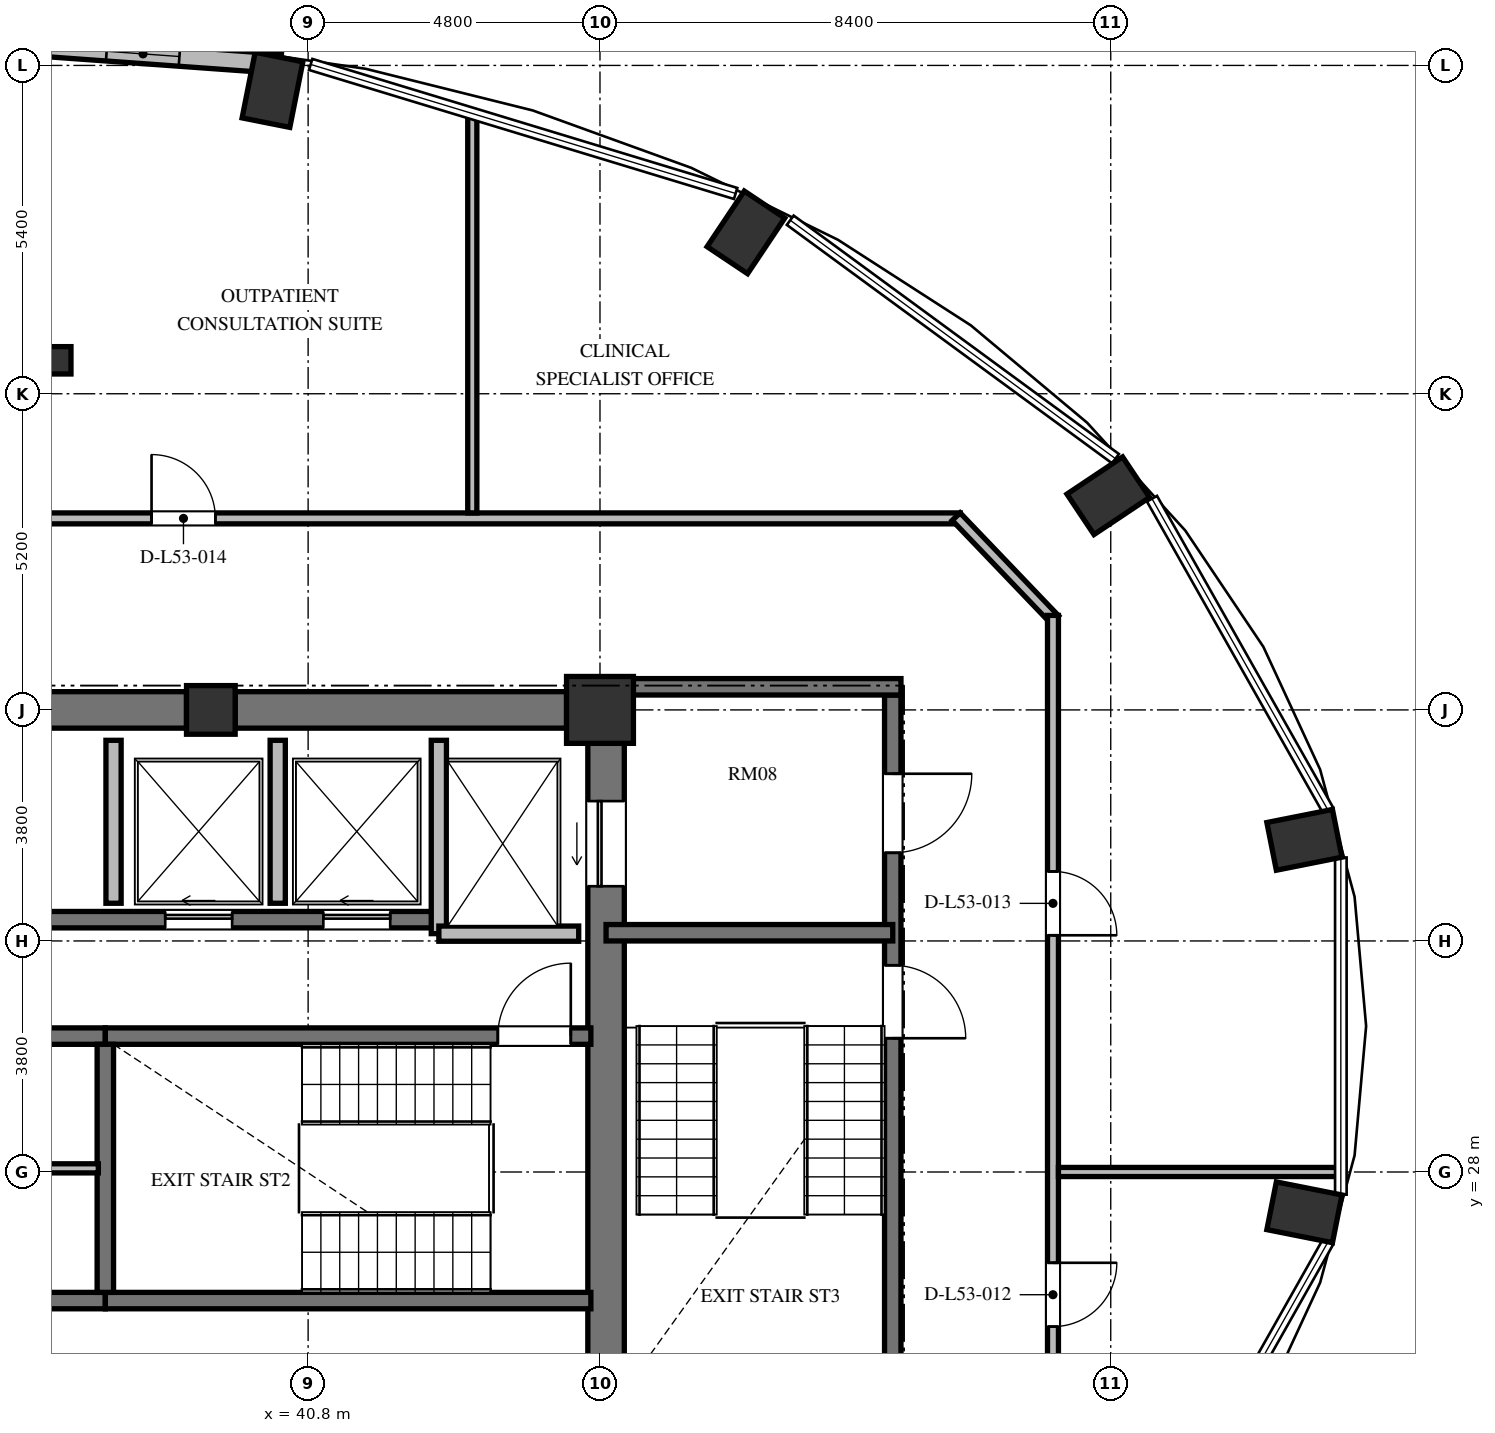
"""IFC4 building model, lengths in metres.
Left out: names, types, materials, properties, quantities, classifications, styles, units other than length and angle.
Written with IfcOpenShell. Run it as: python <this file> out.ifc"""

import sys

from ifc_helpers import new_model, si_unit, direction, frame, frame_2d, origin, origin_2d, place, context, subcontext, project, spatial, rectangle, extrude, element, fill, save


model = new_model("IFC4")
c1 = context("Model", 3, precision=1e-05, world=origin(), true_north=direction((0.0, 1.0)))
c2 = subcontext(c1, "Body", "Model", "MODEL_VIEW")
j1 = project(units=[si_unit("LENGTHUNIT", "METRE"), si_unit("PLANEANGLEUNIT", "RADIAN")], contexts=[c1])
p1 = place(None, origin())
s1 = spatial("IfcSite", under=j1, at=p1, CompositionType="ELEMENT")
p2 = place(p1, origin())
s2 = spatial("IfcBuilding", under=s1, at=p2, CompositionType="ELEMENT")
p3 = place(p2, frame((0.0, 0.0, 205.776)))
s3 = spatial("IfcBuildingStorey", under=s2, at=p3, CompositionType="ELEMENT", Elevation=205.776)
for number, where, z_axis, x_axis in (
    (1, (57.185, 27.337, 0.0), (0.0, 0.0, 1.0), (0.981, -0.195, 0.0)),
    (2, (57.185, 33.463, 0.0), (0.0, 0.0, 1.0), (0.981, 0.195, 0.0)),
    (3, (53.96, 39.123, 0.0), (0.0, 0.0, 1.0), (0.831, 0.556, 0.0)),
    (4, (48.0, 43.454, 0.0), (0.0, 0.0, 1.0), (0.556, 0.831, 0.0)),
    (5, (40.214, 45.798, 0.0), (0.0, 0.0, 1.0), (0.195, 0.981, 0.0)),
):
    element("IfcColumn", number, at=place(p3, frame(where, z_axis=z_axis, x_axis=x_axis)), inside=s3, PredefinedType="COLUMN", context=c2, shape_type="SweptSolid", body=[
        extrude(rectangle(XDim=1.1, YDim=0.8, at=origin_2d()), origin(), (0.0, 0.0, 1.0), 3.648),
    ])
p4 = place(p3, frame((45.6, 35.6, 0.0), z_axis=(0.0, 0.0, 1.0), x_axis=(1.0, 0.0, 0.0)))
e6 = element("IfcColumn", 6, at=p4, inside=s3, PredefinedType="COLUMN", context=c2, shape_type="SweptSolid", body=[
    extrude(rectangle(XDim=1.1, YDim=1.1, at=origin_2d()), origin(), (0.0, 0.0, 1.0), 3.648),
])
p5 = place(p3, frame((39.2, 35.6, 0.0), z_axis=(0.0, 0.0, 1.0), x_axis=(1.0, 0.0, 0.0)))
e7 = element("IfcColumn", 7, at=p5, inside=s3, PredefinedType="COLUMN", context=c2, shape_type="SweptSolid", body=[
    extrude(rectangle(XDim=0.8, YDim=0.8, at=origin_2d()), origin(), (0.0, 0.0, 1.0), 3.648),
])
p6 = place(p3, frame((36.6, 41.35, 0.0), z_axis=(0.0, 0.0, 1.0), x_axis=(1.0, 0.0, 0.0)))
e8 = element("IfcColumn", 8, at=p6, inside=s3, PredefinedType="PILASTER", context=c2, shape_type="SweptSolid", body=[
    extrude(rectangle(XDim=0.6, YDim=0.45, at=origin_2d()), origin(), (0.0, 0.0, 1.0), 3.648),
])
p7 = place(p3, frame((45.7, 20.95, 0.0), z_axis=(0.0, 0.0, 1.0), x_axis=(0.0, 1.0, 0.0)))
e9 = element("IfcWall", 9, at=p7, inside=s3, PredefinedType="SHEAR", context=c2, shape_type="SweptSolid", body=[
    extrude(rectangle(XDim=14.1, YDim=0.6, at=frame_2d((7.05, 0.0))), origin(), (0.0, 0.0, 1.0), 3.648),
])
p8 = place(p7, frame((11.75, 0.0, 0.0)))
e10 = element("IfcOpeningElement", 10, at=p8, cuts=e9, PredefinedType="OPENING", context=c2, shape_type="SweptSolid", body=[
    extrude(rectangle(XDim=1.4, YDim=2.3, at=frame_2d((0.7, 1.15))), frame((0.0, 0.31, 0.0), z_axis=(0.0, -1.0, 0.0), x_axis=(1.0, 0.0, 0.0)), (0.0, 0.0, 1.0), 0.62),
])
p9 = place(p7, frame((0.95, 0.0, 0.0)))
e11 = element("IfcOpeningElement", 11, at=p9, cuts=e9, PredefinedType="OPENING", context=c2, shape_type="SweptSolid", body=[
    extrude(rectangle(XDim=1.4, YDim=2.3, at=frame_2d((0.7, 1.15))), frame((0.0, 0.31, 0.0), z_axis=(0.0, -1.0, 0.0), x_axis=(1.0, 0.0, 0.0)), (0.0, 0.0, 1.0), 0.62),
])
p10 = place(p3, frame((33.2, 35.6, 0.0), z_axis=(0.0, 0.0, 1.0), x_axis=(1.0, 0.0, 0.0)))
e12 = element("IfcWall", 12, at=p10, inside=s3, PredefinedType="SHEAR", context=c2, shape_type="SweptSolid", body=[
    extrude(rectangle(XDim=5.6, YDim=0.6, at=frame_2d((2.8, 0.0))), origin(), (0.0, 0.0, 1.0), 3.648),
])
p11 = place(p3, frame((39.6, 35.6, 0.0), z_axis=(0.0, 0.0, 1.0), x_axis=(1.0, 0.0, 0.0)))
e13 = element("IfcWall", 13, at=p11, inside=s3, PredefinedType="SHEAR", context=c2, shape_type="SweptSolid", body=[
    extrude(rectangle(XDim=5.45, YDim=0.6, at=frame_2d((2.725, 0.0))), origin(), (0.0, 0.0, 1.0), 3.648),
])
p12 = place(p3, frame((40.35, 46.226, 0.0), z_axis=(0.0, 0.0, 1.0), x_axis=(-0.997409061056, 0.071938619141, 0.0)))
e14 = element("IfcWall", 14, at=p12, inside=s3, PredefinedType="SOLIDWALL", context=c2, shape_type="SweptSolid", body=[
    extrude(rectangle(XDim=4.541, YDim=0.32, at=frame_2d((2.271, 0.0))), origin(), (0.0, 0.0, 1.0), 3.448),
])
p13 = place(p12, frame((1.67, 0.0, 0.85)))
e15 = element("IfcOpeningElement", 15, at=p13, cuts=e14, PredefinedType="OPENING", context=c2, shape_type="SweptSolid", body=[
    extrude(rectangle(XDim=1.2, YDim=2.2, at=frame_2d((0.6, 1.1))), frame((0.0, 0.17, 0.0), z_axis=(0.0, -1.0, 0.0), x_axis=(1.0, 0.0, 0.0)), (0.0, 0.0, 1.0), 0.34),
])
p14 = place(p3, frame((34.535, 30.235, 0.0), z_axis=(0.0, 0.0, 1.0), x_axis=(1.0, 0.0, 0.0)))
e16 = element("IfcWall", 16, at=p14, inside=s3, PredefinedType="SHEAR", context=c2, shape_type="SweptSolid", body=[
    extrude(rectangle(XDim=2.93, YDim=0.27, at=frame_2d((1.465, 0.0))), origin(), (0.0, 0.0, 1.0), 3.648),
])
p15 = place(p14, frame((0.915, 0.0, 0.0)))
e17 = element("IfcOpeningElement", 17, at=p15, cuts=e16, PredefinedType="OPENING", context=c2, shape_type="SweptSolid", body=[
    extrude(rectangle(XDim=1.1, YDim=2.15, at=frame_2d((0.55, 1.075))), frame((0.0, 0.145, 0.0), z_axis=(0.0, -1.0, 0.0), x_axis=(1.0, 0.0, 0.0)), (0.0, 0.0, 1.0), 0.29),
])
p16 = place(p3, frame((37.465, 30.235, 0.0), z_axis=(0.0, 0.0, 1.0), x_axis=(1.0, 0.0, 0.0)))
e18 = element("IfcWall", 18, at=p16, inside=s3, PredefinedType="SHEAR", context=c2, shape_type="SweptSolid", body=[
    extrude(rectangle(XDim=7.985, YDim=0.27, at=frame_2d((3.992, 0.0))), origin(), (0.0, 0.0, 1.0), 3.648),
])
p17 = place(p16, frame((6.455, 0.0, 0.0)))
e19 = element("IfcOpeningElement", 19, at=p17, cuts=e18, PredefinedType="OPENING", context=c2, shape_type="SweptSolid", body=[
    extrude(rectangle(XDim=1.2, YDim=2.15, at=frame_2d((0.6, 1.075))), frame((0.0, 0.145, 0.0), z_axis=(0.0, -1.0, 0.0), x_axis=(1.0, 0.0, 0.0)), (0.0, 0.0, 1.0), 0.29),
])
p18 = place(p3, frame((34.535, 25.885, 0.0), z_axis=(0.0, 0.0, 1.0), x_axis=(1.0, 0.0, 0.0)))
e20 = element("IfcWall", 20, at=p18, inside=s3, PredefinedType="SHEAR", context=c2, shape_type="SweptSolid", body=[
    extrude(rectangle(XDim=2.93, YDim=0.27, at=frame_2d((1.465, 0.0))), origin(), (0.0, 0.0, 1.0), 3.648),
])
p19 = place(p18, frame((0.94, 0.0, 0.0)))
e21 = element("IfcOpeningElement", 21, at=p19, cuts=e20, PredefinedType="OPENING", context=c2, shape_type="SweptSolid", body=[
    extrude(rectangle(XDim=1.05, YDim=2.15, at=frame_2d((0.525, 1.075))), frame((0.0, 0.145, 0.0), z_axis=(0.0, -1.0, 0.0), x_axis=(1.0, 0.0, 0.0)), (0.0, 0.0, 1.0), 0.29),
])
p20 = place(p3, frame((37.465, 25.885, 0.0), z_axis=(0.0, 0.0, 1.0), x_axis=(1.0, 0.0, 0.0)))
e22 = element("IfcWall", 22, at=p20, inside=s3, PredefinedType="SHEAR", context=c2, shape_type="SweptSolid", body=[
    extrude(rectangle(XDim=7.985, YDim=0.27, at=frame_2d((3.992, 0.0))), origin(), (0.0, 0.0, 1.0), 3.648),
])
p21 = place(p3, frame((37.465, 26.02, 0.0), z_axis=(0.0, 0.0, 1.0), x_axis=(0.0, 1.0, 0.0)))
e23 = element("IfcWall", 23, at=p21, inside=s3, PredefinedType="SHEAR", context=c2, shape_type="SweptSolid", body=[
    extrude(rectangle(XDim=4.08, YDim=0.27, at=frame_2d((2.04, 0.0))), origin(), (0.0, 0.0, 1.0), 3.648),
])
p22 = place(p3, frame((34.65, 28.06, 0.0), z_axis=(0.0, 0.0, 1.0), x_axis=(1.0, 0.0, 0.0)))
e24 = element("IfcWall", 24, at=p22, inside=s3, PredefinedType="PARTITIONING", context=c2, shape_type="SweptSolid", body=[
    extrude(rectangle(XDim=2.7, YDim=0.15, at=frame_2d((1.35, 0.0))), origin(), (0.0, 0.0, 1.0), 3.448),
])
p23 = place(p3, frame((26.55, 32.15, 0.0), z_axis=(0.0, 0.0, 1.0), x_axis=(1.0, 0.0, 0.0)))
e25 = element("IfcWall", 25, at=p23, inside=s3, PredefinedType="SHEAR", context=c2, shape_type="SweptSolid", body=[
    extrude(rectangle(XDim=16.4, YDim=0.27, at=frame_2d((8.2, 0.0))), origin(), (0.0, 0.0, 1.0), 3.648),
])
p24 = place(p23, frame((2.175, 0.0, 0.0)))
e26 = element("IfcOpeningElement", 26, at=p24, cuts=e25, PredefinedType="OPENING", context=c2, shape_type="SweptSolid", body=[
    extrude(rectangle(XDim=1.05, YDim=2.15, at=frame_2d((0.525, 1.075))), frame((0.0, 0.145, 0.0), z_axis=(0.0, -1.0, 0.0), x_axis=(1.0, 0.0, 0.0)), (0.0, 0.0, 1.0), 0.29),
])
p25 = place(p23, frame((7.575, 0.0, 0.0)))
e27 = element("IfcOpeningElement", 27, at=p25, cuts=e25, PredefinedType="OPENING", context=c2, shape_type="SweptSolid", body=[
    extrude(rectangle(XDim=1.05, YDim=2.15, at=frame_2d((0.525, 1.075))), frame((0.0, 0.145, 0.0), z_axis=(0.0, -1.0, 0.0), x_axis=(1.0, 0.0, 0.0)), (0.0, 0.0, 1.0), 0.29),
])
p26 = place(p23, frame((11.9, 0.0, 0.0)))
e28 = element("IfcOpeningElement", 28, at=p26, cuts=e25, PredefinedType="OPENING", context=c2, shape_type="SweptSolid", body=[
    extrude(rectangle(XDim=1.1, YDim=2.2, at=frame_2d((0.55, 1.1))), frame((0.0, 0.145, 0.0), z_axis=(0.0, -1.0, 0.0), x_axis=(1.0, 0.0, 0.0)), (0.0, 0.0, 1.0), 0.29),
])
p27 = place(p23, frame((14.5, 0.0, 0.0)))
e29 = element("IfcOpeningElement", 29, at=p27, cuts=e25, PredefinedType="OPENING", context=c2, shape_type="SweptSolid", body=[
    extrude(rectangle(XDim=1.1, YDim=2.2, at=frame_2d((0.55, 1.1))), frame((0.0, 0.145, 0.0), z_axis=(0.0, -1.0, 0.0), x_axis=(1.0, 0.0, 0.0)), (0.0, 0.0, 1.0), 0.29),
])
p28 = place(p3, frame((42.95, 31.92, 0.0), z_axis=(0.0, 0.0, 1.0), x_axis=(0.0, 1.0, 0.0)))
e30 = element("IfcWall", 30, at=p28, inside=s3, PredefinedType="SOLIDWALL", context=c2, shape_type="SweptSolid", body=[
    extrude(rectangle(XDim=3.18, YDim=0.25, at=frame_2d((1.59, 0.0))), origin(), (0.0, 0.0, 1.0), 3.448),
])
p29 = place(p3, frame((42.95, 31.92, 0.0), z_axis=(0.0, 0.0, 1.0), x_axis=(1.0, 0.0, 0.0)))
e31 = element("IfcWall", 31, at=p29, inside=s3, PredefinedType="SOLIDWALL", context=c2, shape_type="SweptSolid", body=[
    extrude(rectangle(XDim=2.3, YDim=0.25, at=frame_2d((1.15, 0.0))), origin(), (0.0, 0.0, 1.0), 3.448),
])
for number, where, z_axis, x_axis in (
    (32, (37.6, 32.42, 0.0), (0.0, 0.0, 1.0), (0.0, 1.0, 0.0)),
    (33, (40.3, 32.42, 0.0), (0.0, 0.0, 1.0), (0.0, 1.0, 0.0)),
):
    element("IfcWall", number, at=place(p3, frame(where, z_axis=z_axis, x_axis=x_axis)), inside=s3, PredefinedType="SOLIDWALL", context=c2, shape_type="SweptSolid", body=[
        extrude(rectangle(XDim=2.68, YDim=0.25, at=frame_2d((1.34, 0.0))), origin(), (0.0, 0.0, 1.0), 3.448),
    ])
p30 = place(p3, frame((50.415, 35.845, 0.0), z_axis=(0.0, 0.0, 1.0), x_axis=(0.0, -1.0, 0.0)))
e34 = element("IfcWall", 34, at=p30, inside=s3, PredefinedType="SHEAR", context=c2, shape_type="SweptSolid", body=[
    extrude(rectangle(XDim=15.825, YDim=0.27, at=frame_2d((7.913, 0.0))), origin(), (0.0, 0.0, 1.0), 3.648),
])
p31 = place(p30, frame((4.445, 0.0, 0.0)))
e35 = element("IfcOpeningElement", 35, at=p31, cuts=e34, PredefinedType="OPENING", context=c2, shape_type="SweptSolid", body=[
    extrude(rectangle(XDim=1.2, YDim=2.15, at=frame_2d((0.6, 1.075))), frame((0.0, 0.145, 0.0), z_axis=(0.0, -1.0, 0.0), x_axis=(1.0, 0.0, 0.0)), (0.0, 0.0, 1.0), 0.29),
])
p32 = place(p30, frame((1.295, 0.0, 0.0)))
e36 = element("IfcOpeningElement", 36, at=p32, cuts=e34, PredefinedType="OPENING", context=c2, shape_type="SweptSolid", body=[
    extrude(rectangle(XDim=1.3, YDim=2.2, at=frame_2d((0.65, 1.1))), frame((0.0, 0.145, 0.0), z_axis=(0.0, -1.0, 0.0), x_axis=(1.0, 0.0, 0.0)), (0.0, 0.0, 1.0), 0.29),
])
p33 = place(p30, frame((13.095, 0.0, 0.0)))
e37 = element("IfcOpeningElement", 37, at=p33, cuts=e34, PredefinedType="OPENING", context=c2, shape_type="SweptSolid", body=[
    extrude(rectangle(XDim=1.3, YDim=2.2, at=frame_2d((0.65, 1.1))), frame((0.0, 0.145, 0.0), z_axis=(0.0, -1.0, 0.0), x_axis=(1.0, 0.0, 0.0)), (0.0, 0.0, 1.0), 0.29),
])
p34 = place(p3, frame((46.0, 35.98, 0.0), z_axis=(0.0, 0.0, 1.0), x_axis=(1.0, 0.0, 0.0)))
e38 = element("IfcWall", 38, at=p34, inside=s3, PredefinedType="SHEAR", context=c2, shape_type="SweptSolid", body=[
    extrude(rectangle(XDim=4.55, YDim=0.27, at=frame_2d((2.275, 0.0))), origin(), (0.0, 0.0, 1.0), 3.648),
])
p35 = place(p3, frame((45.7, 31.935, 0.0), z_axis=(0.0, 0.0, 1.0), x_axis=(1.0, 0.0, 0.0)))
e39 = element("IfcWall", 39, at=p35, inside=s3, PredefinedType="SHEAR", context=c2, shape_type="SweptSolid", body=[
    extrude(rectangle(XDim=4.715, YDim=0.27, at=frame_2d((2.357, 0.0))), origin(), (0.0, 0.0, 1.0), 3.648),
])
p36 = place(p3, frame((30.71, 38.75, 0.0), z_axis=(0.0, 0.0, 1.0), x_axis=(1.0, 0.0, 0.0)))
e40 = element("IfcWall", 40, at=p36, inside=s3, PredefinedType="PARTITIONING", context=c2, shape_type="SweptSolid", body=[
    extrude(rectangle(XDim=20.815, YDim=0.18, at=frame_2d((10.408, 0.0))), origin(), (0.0, 0.0, 1.0), 3.073),
])
p37 = place(p36, frame((7.515, 0.0, 0.0)))
e41 = element("IfcOpeningElement", 41, at=p37, cuts=e40, PredefinedType="OPENING", context=c2, shape_type="SweptSolid", body=[
    extrude(rectangle(XDim=1.05, YDim=2.15, at=frame_2d((0.525, 1.075))), frame((0.0, 0.1, 0.0), z_axis=(0.0, -1.0, 0.0), x_axis=(1.0, 0.0, 0.0)), (0.0, 0.0, 1.0), 0.2),
])
p38 = place(p3, frame((51.458, 38.779, 0.0), z_axis=(0.0, 0.0, 1.0), x_axis=(0.691359830363, -0.722510612352, 0.0)))
e42 = element("IfcWall", 42, at=p38, inside=s3, PredefinedType="PARTITIONING", context=c2, shape_type="SweptSolid", body=[
    extrude(rectangle(XDim=2.343, YDim=0.18, at=frame_2d((1.172, 0.0))), origin(), (0.0, 0.0, 1.0), 3.033),
])
p39 = place(p3, frame((53.05, 37.155, 0.0), z_axis=(0.0, 0.0, 1.0), x_axis=(0.0, -1.0, 0.0)))
e43 = element("IfcWall", 43, at=p39, inside=s3, PredefinedType="PARTITIONING", context=c2, shape_type="SweptSolid", body=[
    extrude(rectangle(XDim=13.509, YDim=0.18, at=frame_2d((6.754, 0.0))), origin(), (0.0, 0.0, 1.0), 3.448),
])
p40 = place(p39, frame((10.648, 0.0, 0.0)))
e44 = element("IfcOpeningElement", 44, at=p40, cuts=e43, PredefinedType="OPENING", context=c2, shape_type="SweptSolid", body=[
    extrude(rectangle(XDim=1.05, YDim=2.15, at=frame_2d((0.525, 1.075))), frame((0.0, 0.1, 0.0), z_axis=(0.0, -1.0, 0.0), x_axis=(1.0, 0.0, 0.0)), (0.0, 0.0, 1.0), 0.2),
])
p41 = place(p39, frame((4.211, 0.0, 0.0)))
e45 = element("IfcOpeningElement", 45, at=p41, cuts=e43, PredefinedType="OPENING", context=c2, shape_type="SweptSolid", body=[
    extrude(rectangle(XDim=1.05, YDim=2.15, at=frame_2d((0.525, 1.075))), frame((0.0, 0.1, 0.0), z_axis=(0.0, -1.0, 0.0), x_axis=(1.0, 0.0, 0.0)), (0.0, 0.0, 1.0), 0.2),
])
p42 = place(p3, frame((53.14, 28.0, 0.0), z_axis=(0.0, 0.0, 1.0), x_axis=(1.0, 0.0, 0.0)))
e46 = element("IfcWall", 46, at=p42, inside=s3, PredefinedType="PARTITIONING", context=c2, shape_type="SweptSolid", body=[
    extrude(rectangle(XDim=4.632, YDim=0.15, at=frame_2d((2.316, 0.0))), origin(), (0.0, 0.0, 1.0), 3.448),
])
p43 = place(p3, frame((43.5, 38.84, 0.0), z_axis=(0.0, 0.0, 1.0), x_axis=(0.0, 1.0, 0.0)))
e47 = element("IfcWall", 47, at=p43, inside=s3, PredefinedType="PARTITIONING", context=c2, shape_type="SweptSolid", body=[
    extrude(rectangle(XDim=6.552, YDim=0.15, at=frame_2d((3.276, 0.0))), origin(), (0.0, 0.0, 1.0), 3.448),
])
p44 = place(p13, origin())
e48 = element("IfcWindow", 48, at=p44, inside=s3, PartitioningType="SINGLE_PANEL", PredefinedType="WINDOW", context=c2, shape_type="SweptSolid", body=[
    extrude(rectangle(XDim=1.2, YDim=2.2, at=frame_2d((0.6, 1.1))), frame((0.0, 0.03, 0.0), z_axis=(0.0, -1.0, 0.0), x_axis=(1.0, 0.0, 0.0)), (0.0, 0.0, 1.0), 0.06),
])
fill(e15, e48)
p45 = place(p17, origin())
e49 = element("IfcDoor", 49, at=p45, inside=s3, OperationType="SINGLE_SWING_RIGHT", PredefinedType="DOOR", context=c2, shape_type="SweptSolid", body=[
    extrude(rectangle(XDim=1.2, YDim=2.15, at=frame_2d((0.6, 1.075))), frame((0.0, 0.025, 0.0), z_axis=(0.0, -1.0, 0.0), x_axis=(1.0, 0.0, 0.0)), (0.0, 0.0, 1.0), 0.05),
])
fill(e19, e49)
p46 = place(p26, origin())
e50 = element("IfcDoor", 50, at=p46, inside=s3, OperationType="SLIDING_TO_LEFT", PredefinedType="DOOR", context=c2, shape_type="SweptSolid", body=[
    extrude(rectangle(XDim=1.1, YDim=2.2, at=frame_2d((0.55, 1.1))), frame((0.0, 0.025, 0.0), z_axis=(0.0, -1.0, 0.0), x_axis=(1.0, 0.0, 0.0)), (0.0, 0.0, 1.0), 0.05),
])
fill(e28, e50)
p47 = place(p27, origin())
e51 = element("IfcDoor", 51, at=p47, inside=s3, OperationType="SLIDING_TO_LEFT", PredefinedType="DOOR", context=c2, shape_type="SweptSolid", body=[
    extrude(rectangle(XDim=1.1, YDim=2.2, at=frame_2d((0.55, 1.1))), frame((0.0, 0.025, 0.0), z_axis=(0.0, -1.0, 0.0), x_axis=(1.0, 0.0, 0.0)), (0.0, 0.0, 1.0), 0.05),
])
fill(e29, e51)
p48 = place(p8, origin())
e52 = element("IfcDoor", 52, at=p48, inside=s3, OperationType="SLIDING_TO_LEFT", PredefinedType="DOOR", context=c2, shape_type="SweptSolid", body=[
    extrude(rectangle(XDim=1.4, YDim=2.3, at=frame_2d((0.7, 1.15))), frame((0.0, 0.025, 0.0), z_axis=(0.0, -1.0, 0.0), x_axis=(1.0, 0.0, 0.0)), (0.0, 0.0, 1.0), 0.05),
])
fill(e10, e52)
p49 = place(p31, origin())
e53 = element("IfcDoor", 53, at=p49, inside=s3, OperationType="SINGLE_SWING_RIGHT", PredefinedType="DOOR", context=c2, shape_type="SweptSolid", body=[
    extrude(rectangle(XDim=1.2, YDim=2.15, at=frame_2d((0.6, 1.075))), frame((0.0, 0.025, 0.0), z_axis=(0.0, -1.0, 0.0), x_axis=(1.0, 0.0, 0.0)), (0.0, 0.0, 1.0), 0.05),
])
fill(e35, e53)
p50 = place(p32, origin())
e54 = element("IfcDoor", 54, at=p50, inside=s3, OperationType="SINGLE_SWING_LEFT", PredefinedType="DOOR", context=c2, shape_type="SweptSolid", body=[
    extrude(rectangle(XDim=1.3, YDim=2.2, at=frame_2d((0.65, 1.1))), frame((0.0, 0.025, 0.0), z_axis=(0.0, -1.0, 0.0), x_axis=(1.0, 0.0, 0.0)), (0.0, 0.0, 1.0), 0.05),
])
fill(e36, e54)
p51 = place(p40, origin())
e55 = element("IfcDoor", 55, at=p51, inside=s3, OperationType="SINGLE_SWING_LEFT", PredefinedType="DOOR", context=c2, shape_type="SweptSolid", body=[
    extrude(rectangle(XDim=1.05, YDim=2.15, at=frame_2d((0.525, 1.075))), frame((0.0, 0.025, 0.0), z_axis=(0.0, -1.0, 0.0), x_axis=(1.0, 0.0, 0.0)), (0.0, 0.0, 1.0), 0.05),
])
fill(e44, e55)
p52 = place(p41, origin())
e56 = element("IfcDoor", 56, at=p52, inside=s3, OperationType="SINGLE_SWING_RIGHT", PredefinedType="DOOR", context=c2, shape_type="SweptSolid", body=[
    extrude(rectangle(XDim=1.05, YDim=2.15, at=frame_2d((0.525, 1.075))), frame((0.0, 0.025, 0.0), z_axis=(0.0, -1.0, 0.0), x_axis=(1.0, 0.0, 0.0)), (0.0, 0.0, 1.0), 0.05),
])
fill(e45, e56)
p53 = place(p37, origin())
e57 = element("IfcDoor", 57, at=p53, inside=s3, OperationType="SINGLE_SWING_LEFT", PredefinedType="DOOR", context=c2, shape_type="SweptSolid", body=[
    extrude(rectangle(XDim=1.05, YDim=2.15, at=frame_2d((0.525, 1.075))), frame((0.0, 0.025, 0.0), z_axis=(0.0, -1.0, 0.0), x_axis=(1.0, 0.0, 0.0)), (0.0, 0.0, 1.0), 0.05),
])
fill(e41, e57)
save(model, sys.argv[1])
